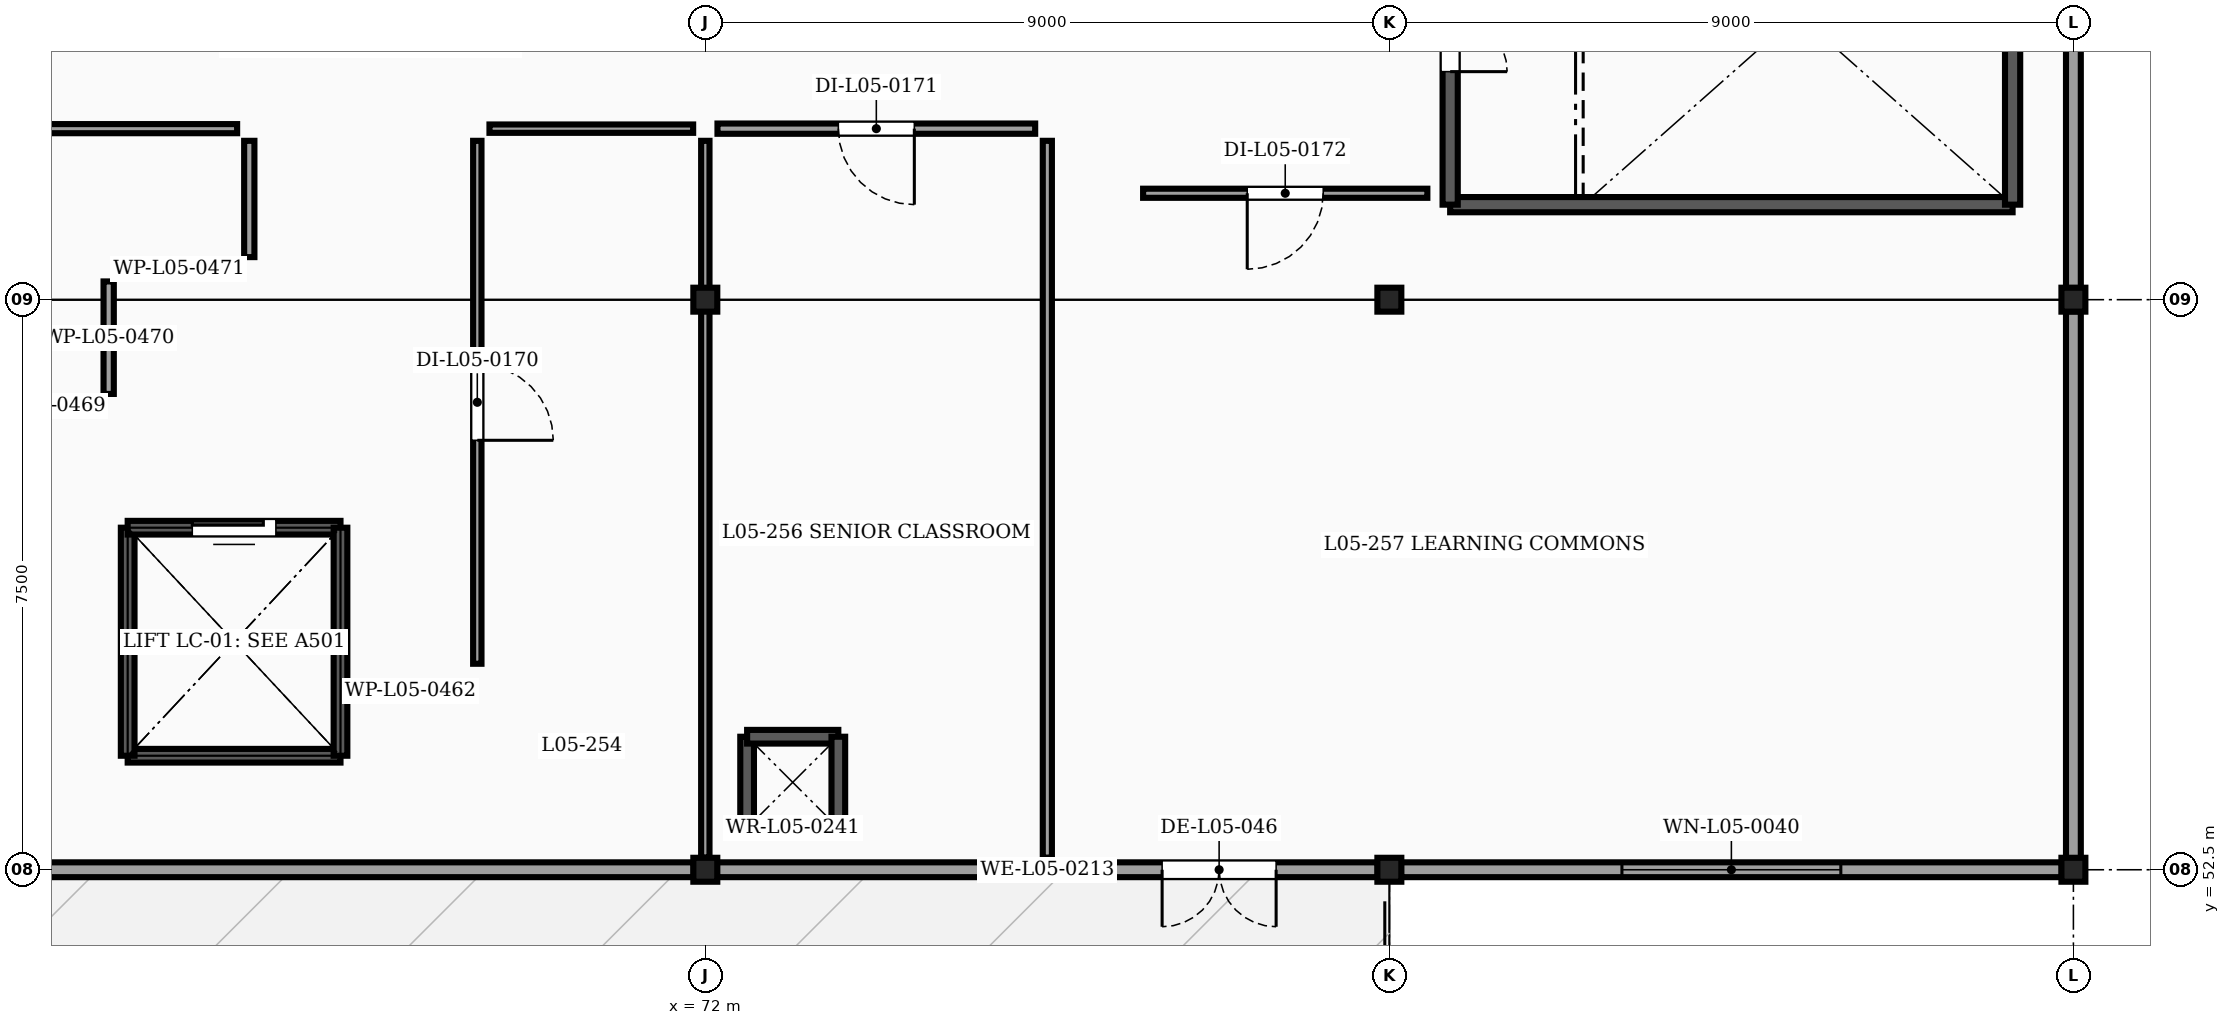
"""IFC4 building model, lengths in metres.
Left out: names, types, materials, properties, quantities, classifications, styles, units other than length and angle.
Written with IfcOpenShell. Run it as: python <this file> out.ifc"""

import sys

from ifc_helpers import new_model, si_unit, direction, frame, frame_2d, origin, origin_2d, place, context, subcontext, project, spatial, rectangle, extrude, element, fill, save


model = new_model("IFC4")
c1 = context("Model", 3, precision=1e-05, world=origin(), true_north=direction((0.0, 1.0)))
c2 = subcontext(c1, "Body", "Model", "MODEL_VIEW")
j1 = project(units=[si_unit("LENGTHUNIT", "METRE"), si_unit("PLANEANGLEUNIT", "RADIAN")], contexts=[c1])
p1 = place(None, origin())
s1 = spatial("IfcSite", under=j1, at=p1, CompositionType="ELEMENT")
p2 = place(p1, origin())
s2 = spatial("IfcBuilding", under=s1, at=p2, CompositionType="ELEMENT")
p3 = place(p2, frame((0.0, 0.0, 19.9)))
s3 = spatial("IfcBuildingStorey", under=s2, at=p3, CompositionType="ELEMENT", Elevation=19.9)
for number, where, z_axis, x_axis in (
    (1, (72.0, 52.5, 0.0), (0.0, 0.0, 1.0), (1.0, 0.0, 0.0)),
    (2, (81.0, 52.5, 0.0), (0.0, 0.0, 1.0), (1.0, 0.0, 0.0)),
    (3, (90.0, 52.5, 0.0), (0.0, 0.0, 1.0), (1.0, 0.0, 0.0)),
    (4, (72.0, 60.0, 0.0), (0.0, 0.0, 1.0), (1.0, 0.0, 0.0)),
    (5, (81.0, 60.0, 0.0), (0.0, 0.0, 1.0), (1.0, 0.0, 0.0)),
    (6, (90.0, 60.0, 0.0), (0.0, 0.0, 1.0), (1.0, 0.0, 0.0)),
):
    element("IfcColumn", number, at=place(p3, frame(where, z_axis=z_axis, x_axis=x_axis)), inside=s3, PredefinedType="COLUMN", context=c2, shape_type="SweptSolid", body=[
        extrude(rectangle(XDim=0.315, YDim=0.315, at=origin_2d()), origin(), (0.0, 0.0, 1.0), 3.8),
    ])
p4 = place(p3, frame((89.846, 52.5, 0.0), z_axis=(0.0, 0.0, 1.0), x_axis=(-1.0, 0.0, 0.0)))
e7 = element("IfcWall", 7, at=p4, inside=s3, PredefinedType="SOLIDWALL", context=c2, shape_type="SweptSolid", body=[
    extrude(rectangle(XDim=8.693, YDim=0.195, at=frame_2d((4.346, 0.0))), origin(), (0.0, 0.0, 1.0), 4.48),
])
p5 = place(p4, frame((2.906, 0.0, 0.95)))
e8 = element("IfcOpeningElement", 8, at=p5, cuts=e7, PredefinedType="OPENING", context=c2, shape_type="SweptSolid", body=[
    extrude(rectangle(XDim=2.88, YDim=1.44, at=frame_2d((1.44, 0.72))), frame((0.0, 0.107, 0.0), z_axis=(0.0, -1.0, 0.0), x_axis=(1.0, 0.0, 0.0)), (0.0, 0.0, 1.0), 0.215),
])
p6 = place(p3, frame((80.846, 52.5, 0.0), z_axis=(0.0, 0.0, 1.0), x_axis=(-1.0, 0.0, 0.0)))
e9 = element("IfcWall", 9, at=p6, inside=s3, PredefinedType="SOLIDWALL", context=c2, shape_type="SweptSolid", body=[
    extrude(rectangle(XDim=8.693, YDim=0.195, at=frame_2d((4.346, 0.0))), origin(), (0.0, 0.0, 1.0), 4.48),
])
p7 = place(p6, frame((1.336, 0.0, 0.0)))
e10 = element("IfcOpeningElement", 10, at=p7, cuts=e9, PredefinedType="OPENING", context=c2, shape_type="SweptSolid", body=[
    extrude(rectangle(XDim=1.5, YDim=2.15, at=frame_2d((0.75, 1.075))), frame((0.0, 0.107, 0.0), z_axis=(0.0, -1.0, 0.0), x_axis=(1.0, 0.0, 0.0)), (0.0, 0.0, 1.0), 0.215),
])
p8 = place(p3, frame((71.846, 52.5, 0.0), z_axis=(0.0, 0.0, 1.0), x_axis=(-1.0, 0.0, 0.0)))
e11 = element("IfcWall", 11, at=p8, inside=s3, PredefinedType="SOLIDWALL", context=c2, shape_type="SweptSolid", body=[
    extrude(rectangle(XDim=8.693, YDim=0.195, at=frame_2d((4.346, 0.0))), origin(), (0.0, 0.0, 1.0), 4.48),
])
for number, where, z_axis, x_axis in (
    (12, (90.0, 67.346, 0.0), (0.0, 0.0, 1.0), (0.0, -1.0, 0.0)),
    (13, (90.0, 59.846, 0.0), (0.0, 0.0, 1.0), (0.0, -1.0, 0.0)),
):
    element("IfcWall", number, at=place(p3, frame(where, z_axis=z_axis, x_axis=x_axis)), inside=s3, PredefinedType="SOLIDWALL", context=c2, shape_type="SweptSolid", body=[
        extrude(rectangle(XDim=7.193, YDim=0.195, at=frame_2d((3.596, 0.0))), origin(), (0.0, 0.0, 1.0), 4.112),
    ])
for number, where, z_axis, x_axis in (
    (14, (73.75, 53.05, 0.0), (0.0, 0.0, 1.0), (-1.0, 0.0, 0.0)),
    (15, (72.55, 53.05, 0.0), (0.0, 0.0, 1.0), (0.0, 1.0, 0.0)),
    (16, (72.55, 54.25, 0.0), (0.0, 0.0, 1.0), (1.0, 0.0, 0.0)),
    (17, (73.75, 54.25, 0.0), (0.0, 0.0, 1.0), (0.0, -1.0, 0.0)),
):
    element("IfcWall", number, at=place(p3, frame(where, z_axis=z_axis, x_axis=x_axis)), inside=s3, PredefinedType="SHEAR", context=c2, shape_type="SweptSolid", body=[
        extrude(rectangle(XDim=1.2, YDim=0.18, at=frame_2d((0.6, 0.0))), origin(), (0.0, 0.0, 1.0), 5.1),
    ])
p9 = place(p3, frame((81.8, 61.25, 0.0), z_axis=(0.0, 0.0, 1.0), x_axis=(1.0, 0.0, 0.0)))
e18 = element("IfcWall", 18, at=p9, inside=s3, PredefinedType="SHEAR", context=c2, shape_type="SweptSolid", body=[
    extrude(rectangle(XDim=7.4, YDim=0.2, at=frame_2d((3.7, 0.0))), origin(), (0.0, 0.0, 1.0), 5.1),
])
p10 = place(p3, frame((89.2, 61.25, 0.0), z_axis=(0.0, 0.0, 1.0), x_axis=(0.0, 1.0, 0.0)))
e19 = element("IfcWall", 19, at=p10, inside=s3, PredefinedType="SHEAR", context=c2, shape_type="SweptSolid", body=[
    extrude(rectangle(XDim=5.0, YDim=0.2, at=frame_2d((2.5, 0.0))), origin(), (0.0, 0.0, 1.0), 5.1),
])
p11 = place(p3, frame((81.8, 66.25, 0.0), z_axis=(0.0, 0.0, 1.0), x_axis=(0.0, -1.0, 0.0)))
e20 = element("IfcWall", 20, at=p11, inside=s3, PredefinedType="SHEAR", context=c2, shape_type="SweptSolid", body=[
    extrude(rectangle(XDim=5.0, YDim=0.2, at=frame_2d((2.5, 0.0))), origin(), (0.0, 0.0, 1.0), 5.1),
])
p12 = place(p11, frame((1.75, 0.0, 0.0)))
e21 = element("IfcOpeningElement", 21, at=p12, cuts=e20, PredefinedType="OPENING", context=c2, shape_type="SweptSolid", body=[
    extrude(rectangle(XDim=1.5, YDim=2.15, at=frame_2d((0.75, 1.075))), frame((0.0, 0.11, 0.0), z_axis=(0.0, -1.0, 0.0), x_axis=(1.0, 0.0, 0.0)), (0.0, 0.0, 1.0), 0.22),
])
p13 = place(p3, frame((67.2, 54.0, 0.0), z_axis=(0.0, 0.0, 1.0), x_axis=(-1.0, 0.0, 0.0)))
e22 = element("IfcWall", 22, at=p13, inside=s3, PredefinedType="SHEAR", context=c2, shape_type="SweptSolid", body=[
    extrude(rectangle(XDim=2.8, YDim=0.18, at=frame_2d((1.4, 0.0))), origin(), (0.0, 0.0, 1.0), 5.1),
])
p14 = place(p3, frame((64.4, 54.0, 0.0), z_axis=(0.0, 0.0, 1.0), x_axis=(0.0, 1.0, 0.0)))
e23 = element("IfcWall", 23, at=p14, inside=s3, PredefinedType="SHEAR", context=c2, shape_type="SweptSolid", body=[
    extrude(rectangle(XDim=3.0, YDim=0.18, at=frame_2d((1.5, 0.0))), origin(), (0.0, 0.0, 1.0), 5.1),
])
p15 = place(p3, frame((64.4, 57.0, 0.0), z_axis=(0.0, 0.0, 1.0), x_axis=(1.0, 0.0, 0.0)))
e24 = element("IfcWall", 24, at=p15, inside=s3, PredefinedType="SHEAR", context=c2, shape_type="SweptSolid", body=[
    extrude(rectangle(XDim=2.8, YDim=0.18, at=frame_2d((1.4, 0.0))), origin(), (0.0, 0.0, 1.0), 5.1),
])
p16 = place(p15, frame((0.85, 0.0, 0.0)))
e25 = element("IfcOpeningElement", 25, at=p16, cuts=e24, PredefinedType="OPENING", context=c2, shape_type="SweptSolid", body=[
    extrude(rectangle(XDim=1.1, YDim=2.15, at=frame_2d((0.55, 1.075))), frame((0.0, 0.1, 0.0), z_axis=(0.0, -1.0, 0.0), x_axis=(1.0, 0.0, 0.0)), (0.0, 0.0, 1.0), 0.2),
])
p17 = place(p3, frame((67.2, 57.0, 0.0), z_axis=(0.0, 0.0, 1.0), x_axis=(0.0, -1.0, 0.0)))
e26 = element("IfcWall", 26, at=p17, inside=s3, PredefinedType="SHEAR", context=c2, shape_type="SweptSolid", body=[
    extrude(rectangle(XDim=3.0, YDim=0.18, at=frame_2d((1.5, 0.0))), origin(), (0.0, 0.0, 1.0), 5.1),
])
p18 = place(p3, frame((68.74, 54.85, 0.0), z_axis=(0.0, 0.0, 1.0), x_axis=(-1.0, 0.0, 0.0)))
e27 = element("IfcWall", 27, at=p18, inside=s3, PredefinedType="PARTITIONING", context=c2, shape_type="SweptSolid", body=[
    extrude(rectangle(XDim=1.24, YDim=0.11, at=frame_2d((0.62, 0.0))), origin(), (0.0, 0.0, 1.0), 5.1),
])
p19 = place(p3, frame((69.0, 62.09, 0.0), z_axis=(0.0, 0.0, 1.0), x_axis=(0.0, -1.0, 0.0)))
e28 = element("IfcWall", 28, at=p19, inside=s3, PredefinedType="PARTITIONING", context=c2, shape_type="SweptSolid", body=[
    extrude(rectangle(XDim=6.88, YDim=0.11, at=frame_2d((3.44, 0.0))), origin(), (0.0, 0.0, 1.0), 5.1),
])
p20 = place(p19, frame((2.94, 0.0, 0.0)))
e29 = element("IfcOpeningElement", 29, at=p20, cuts=e28, PredefinedType="OPENING", context=c2, shape_type="SweptSolid", body=[
    extrude(rectangle(XDim=1.0, YDim=2.15, at=frame_2d((0.5, 1.075))), frame((0.0, 0.065, 0.0), z_axis=(0.0, -1.0, 0.0), x_axis=(1.0, 0.0, 0.0)), (0.0, 0.0, 1.0), 0.13),
])
p21 = place(p3, frame((71.84, 62.25, 0.0), z_axis=(0.0, 0.0, 1.0), x_axis=(-1.0, 0.0, 0.0)))
e30 = element("IfcWall", 30, at=p21, inside=s3, PredefinedType="PARTITIONING", context=c2, shape_type="SweptSolid", body=[
    extrude(rectangle(XDim=2.68, YDim=0.11, at=frame_2d((1.34, 0.0))), origin(), (0.0, 0.0, 1.0), 5.1),
])
p22 = place(p3, frame((72.0, 52.66, 0.0), z_axis=(0.0, 0.0, 1.0), x_axis=(0.0, 1.0, 0.0)))
e31 = element("IfcWall", 31, at=p22, inside=s3, PredefinedType="PARTITIONING", context=c2, shape_type="SweptSolid", body=[
    extrude(rectangle(XDim=9.43, YDim=0.11, at=frame_2d((4.715, 0.0))), origin(), (0.0, 0.0, 1.0), 4.112),
])
p23 = place(p3, frame((76.34, 62.25, 0.0), z_axis=(0.0, 0.0, 1.0), x_axis=(-1.0, 0.0, 0.0)))
e32 = element("IfcWall", 32, at=p23, inside=s3, PredefinedType="PARTITIONING", context=c2, shape_type="SweptSolid", body=[
    extrude(rectangle(XDim=4.18, YDim=0.135, at=frame_2d((2.09, 0.0))), origin(), (0.0, 0.0, 1.0), 5.1),
])
p24 = place(p23, frame((1.59, 0.0, 0.0)))
e33 = element("IfcOpeningElement", 33, at=p24, cuts=e32, PredefinedType="OPENING", context=c2, shape_type="SweptSolid", body=[
    extrude(rectangle(XDim=1.0, YDim=2.15, at=frame_2d((0.5, 1.075))), frame((0.0, 0.077, 0.0), z_axis=(0.0, -1.0, 0.0), x_axis=(1.0, 0.0, 0.0)), (0.0, 0.0, 1.0), 0.155),
])
p25 = place(p3, frame((81.5, 61.4, 0.0), z_axis=(0.0, 0.0, 1.0), x_axis=(-1.0, 0.0, 0.0)))
e34 = element("IfcWall", 34, at=p25, inside=s3, PredefinedType="PARTITIONING", context=c2, shape_type="SweptSolid", body=[
    extrude(rectangle(XDim=3.74, YDim=0.12, at=frame_2d((1.87, 0.0))), origin(), (0.0, 0.0, 1.0), 5.1),
])
p26 = place(p25, frame((1.37, 0.0, 0.0)))
e35 = element("IfcOpeningElement", 35, at=p26, cuts=e34, PredefinedType="OPENING", context=c2, shape_type="SweptSolid", body=[
    extrude(rectangle(XDim=1.0, YDim=2.15, at=frame_2d((0.5, 1.075))), frame((0.0, 0.07, 0.0), z_axis=(0.0, -1.0, 0.0), x_axis=(1.0, 0.0, 0.0)), (0.0, 0.0, 1.0), 0.14),
])
p27 = place(p3, frame((62.5, 58.6, 0.0), z_axis=(0.0, 0.0, 1.0), x_axis=(1.0, 0.0, 0.0)))
e36 = element("IfcWall", 36, at=p27, inside=s3, PredefinedType="PARTITIONING", context=c2, shape_type="SweptSolid", body=[
    extrude(rectangle(XDim=1.49, YDim=0.1, at=frame_2d((0.745, 0.0))), origin(), (0.0, 0.0, 1.0), 5.1),
])
p28 = place(p3, frame((64.15, 58.76, 0.0), z_axis=(0.0, 0.0, 1.0), x_axis=(0.0, 1.0, 0.0)))
e37 = element("IfcWall", 37, at=p28, inside=s3, PredefinedType="PARTITIONING", context=c2, shape_type="SweptSolid", body=[
    extrude(rectangle(XDim=1.48, YDim=0.135, at=frame_2d((0.74, 0.0))), origin(), (0.0, 0.0, 1.0), 5.1),
])
p29 = place(p3, frame((64.31, 60.4, 0.0), z_axis=(0.0, 0.0, 1.0), x_axis=(1.0, 0.0, 0.0)))
e38 = element("IfcWall", 38, at=p29, inside=s3, PredefinedType="PARTITIONING", context=c2, shape_type="SweptSolid", body=[
    extrude(rectangle(XDim=1.53, YDim=0.12, at=frame_2d((0.765, 0.0))), origin(), (0.0, 0.0, 1.0), 5.1),
])
p30 = place(p3, frame((66.0, 60.56, 0.0), z_axis=(0.0, 0.0, 1.0), x_axis=(0.0, 1.0, 0.0)))
e39 = element("IfcWall", 39, at=p30, inside=s3, PredefinedType="PARTITIONING", context=c2, shape_type="SweptSolid", body=[
    extrude(rectangle(XDim=1.53, YDim=0.135, at=frame_2d((0.765, 0.0))), origin(), (0.0, 0.0, 1.0), 5.1),
])
p31 = place(p3, frame((65.84, 62.25, 0.0), z_axis=(0.0, 0.0, 1.0), x_axis=(-1.0, 0.0, 0.0)))
e40 = element("IfcWall", 40, at=p31, inside=s3, PredefinedType="PARTITIONING", context=c2, shape_type="SweptSolid", body=[
    extrude(rectangle(XDim=7.18, YDim=0.12, at=frame_2d((3.59, 0.0))), origin(), (0.0, 0.0, 1.0), 5.1),
])
p32 = place(p31, frame((3.09, 0.0, 0.0)))
e41 = element("IfcOpeningElement", 41, at=p32, cuts=e40, PredefinedType="OPENING", context=c2, shape_type="SweptSolid", body=[
    extrude(rectangle(XDim=1.0, YDim=2.15, at=frame_2d((0.5, 1.075))), frame((0.0, 0.07, 0.0), z_axis=(0.0, -1.0, 0.0), x_axis=(1.0, 0.0, 0.0)), (0.0, 0.0, 1.0), 0.14),
])
p33 = place(p3, frame((76.5, 52.66, 0.0), z_axis=(0.0, 0.0, 1.0), x_axis=(0.0, 1.0, 0.0)))
e42 = element("IfcWall", 42, at=p33, inside=s3, PredefinedType="PARTITIONING", context=c2, shape_type="SweptSolid", body=[
    extrude(rectangle(XDim=9.43, YDim=0.12, at=frame_2d((4.715, 0.0))), origin(), (0.0, 0.0, 1.0), 5.1),
])
p34 = place(p5, origin())
e43 = element("IfcWindow", 43, at=p34, inside=s3, PartitioningType="DOUBLE_PANEL_VERTICAL", PredefinedType="WINDOW", context=c2, shape_type="SweptSolid", body=[
    extrude(rectangle(XDim=2.88, YDim=1.44, at=frame_2d((1.44, 0.72))), frame((0.0, 0.03, 0.0), z_axis=(0.0, -1.0, 0.0), x_axis=(1.0, 0.0, 0.0)), (0.0, 0.0, 1.0), 0.06),
])
fill(e8, e43)
p35 = place(p7, origin())
e44 = element("IfcDoor", 44, at=p35, inside=s3, OperationType="DOUBLE_DOOR_SINGLE_SWING", PredefinedType="DOOR", context=c2, shape_type="SweptSolid", body=[
    extrude(rectangle(XDim=1.5, YDim=2.15, at=frame_2d((0.75, 1.075))), frame((0.0, 0.025, 0.0), z_axis=(0.0, -1.0, 0.0), x_axis=(1.0, 0.0, 0.0)), (0.0, 0.0, 1.0), 0.05),
])
fill(e10, e44)
p36 = place(p12, origin())
e45 = element("IfcDoor", 45, at=p36, inside=s3, OperationType="DOUBLE_DOOR_SINGLE_SWING", PredefinedType="DOOR", context=c2, shape_type="SweptSolid", body=[
    extrude(rectangle(XDim=1.5, YDim=2.15, at=frame_2d((0.75, 1.075))), frame((0.0, 0.025, 0.0), z_axis=(0.0, -1.0, 0.0), x_axis=(1.0, 0.0, 0.0)), (0.0, 0.0, 1.0), 0.05),
])
fill(e21, e45)
p37 = place(p16, origin())
e46 = element("IfcDoor", 46, at=p37, inside=s3, OperationType="SLIDING_TO_LEFT", PredefinedType="DOOR", context=c2, shape_type="SweptSolid", body=[
    extrude(rectangle(XDim=1.1, YDim=2.15, at=frame_2d((0.55, 1.075))), frame((0.0, 0.025, 0.0), z_axis=(0.0, -1.0, 0.0), x_axis=(1.0, 0.0, 0.0)), (0.0, 0.0, 1.0), 0.05),
])
fill(e25, e46)
p38 = place(p20, origin())
e47 = element("IfcDoor", 47, at=p38, inside=s3, OperationType="SINGLE_SWING_RIGHT", PredefinedType="DOOR", context=c2, shape_type="SweptSolid", body=[
    extrude(rectangle(XDim=1.0, YDim=2.15, at=frame_2d((0.5, 1.075))), frame((0.0, 0.025, 0.0), z_axis=(0.0, -1.0, 0.0), x_axis=(1.0, 0.0, 0.0)), (0.0, 0.0, 1.0), 0.05),
])
fill(e29, e47)
p39 = place(p24, origin())
e48 = element("IfcDoor", 48, at=p39, inside=s3, OperationType="SINGLE_SWING_LEFT", PredefinedType="DOOR", context=c2, shape_type="SweptSolid", body=[
    extrude(rectangle(XDim=1.0, YDim=2.15, at=frame_2d((0.5, 1.075))), frame((0.0, 0.025, 0.0), z_axis=(0.0, -1.0, 0.0), x_axis=(1.0, 0.0, 0.0)), (0.0, 0.0, 1.0), 0.05),
])
fill(e33, e48)
p40 = place(p26, origin())
e49 = element("IfcDoor", 49, at=p40, inside=s3, OperationType="SINGLE_SWING_RIGHT", PredefinedType="DOOR", context=c2, shape_type="SweptSolid", body=[
    extrude(rectangle(XDim=1.0, YDim=2.15, at=frame_2d((0.5, 1.075))), frame((0.0, 0.025, 0.0), z_axis=(0.0, -1.0, 0.0), x_axis=(1.0, 0.0, 0.0)), (0.0, 0.0, 1.0), 0.05),
])
fill(e35, e49)
save(model, sys.argv[1])
